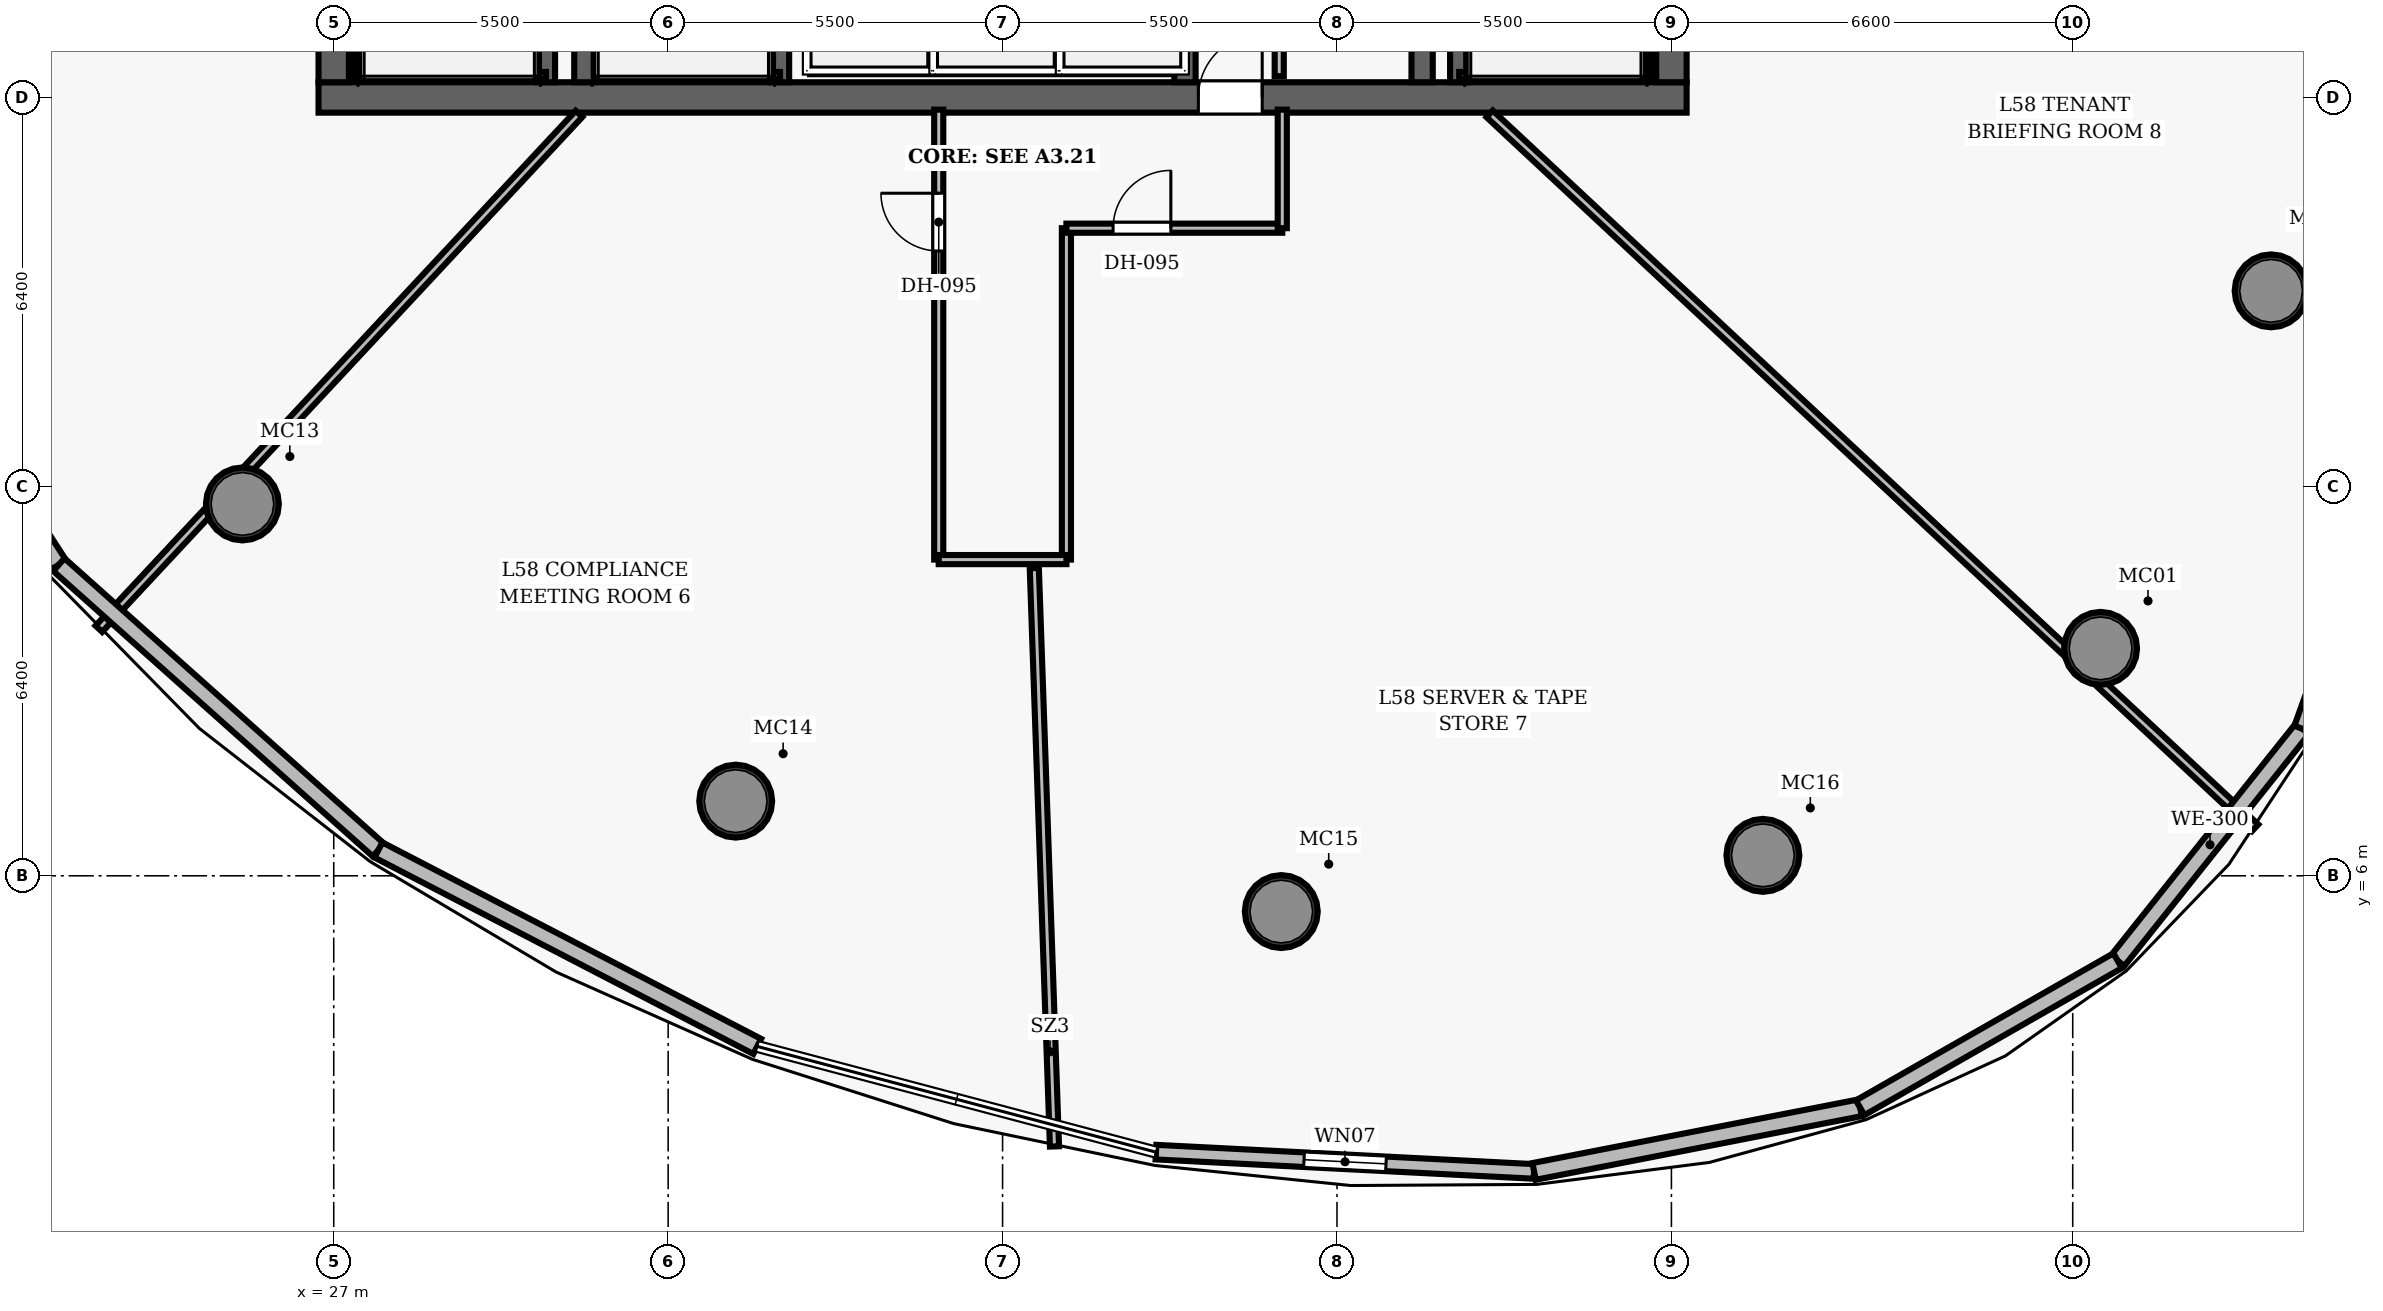
"""IFC4 building model, lengths in metres.
Left out: names, types, materials, properties, quantities, classifications, styles, units other than length and angle.
Written with IfcOpenShell. Run it as: python <this file> out.ifc"""

import sys

from ifc_helpers import new_model, si_unit, direction, frame, frame_2d, origin, origin_2d, place, context, subcontext, project, spatial, rectangle, hollow_circle, extrude, element, fill, save


model = new_model("IFC4")
c1 = context("Model", 3, precision=1e-05, world=origin(), true_north=direction((0.0, 1.0)))
c2 = subcontext(c1, "Body", "Model", "MODEL_VIEW")
j1 = project(units=[si_unit("LENGTHUNIT", "METRE"), si_unit("PLANEANGLEUNIT", "RADIAN")], contexts=[c1])
p1 = place(None, origin())
s1 = spatial("IfcSite", under=j1, at=p1, CompositionType="ELEMENT")
p2 = place(p1, origin())
s2 = spatial("IfcBuilding", under=s1, at=p2, CompositionType="ELEMENT")
p3 = place(p2, frame((0.0, 0.0, 228.95)))
s3 = spatial("IfcBuildingStorey", under=s2, at=p3, CompositionType="ELEMENT", Elevation=228.95)
p4 = place(p3, frame((26.75, 18.8, 0.0), z_axis=(0.0, 0.0, 1.0), x_axis=(1.0, 0.0, 0.0)))
e1 = element("IfcWall", 1, at=p4, inside=s3, PredefinedType="SHEAR", context=c2, shape_type="SweptSolid", body=[
    extrude(rectangle(XDim=22.5, YDim=0.5, at=frame_2d((11.25, 0.0))), origin(), (0.0, 0.0, 1.0), 3.85),
])
p5 = place(p4, frame((14.47, 0.0, 0.0)))
e2 = element("IfcOpeningElement", 2, at=p5, cuts=e1, PredefinedType="OPENING", context=c2, shape_type="SweptSolid", body=[
    extrude(rectangle(XDim=1.05, YDim=2.15, at=frame_2d((0.525, 1.075))), frame((0.0, 0.26, 0.0), z_axis=(0.0, -1.0, 0.0), x_axis=(1.0, 0.0, 0.0)), (0.0, 0.0, 1.0), 0.52),
])
p6 = place(p3, frame((27.0, 19.05, 0.0), z_axis=(0.0, 0.0, 1.0), x_axis=(0.0, 1.0, 0.0)))
e3 = element("IfcWall", 3, at=p6, inside=s3, PredefinedType="SHEAR", context=c2, shape_type="SweptSolid", body=[
    extrude(rectangle(XDim=13.9, YDim=0.5, at=frame_2d((6.95, 0.0))), origin(), (0.0, 0.0, 1.0), 3.85),
])
p7 = place(p6, frame((8.2, 0.0, 0.0)))
e4 = element("IfcOpeningElement", 4, at=p7, cuts=e3, PredefinedType="OPENING", context=c2, shape_type="SweptSolid", body=[
    extrude(rectangle(XDim=1.05, YDim=2.15, at=frame_2d((0.525, 1.075))), frame((0.0, 0.26, 0.0), z_axis=(0.0, -1.0, 0.0), x_axis=(1.0, 0.0, 0.0)), (0.0, 0.0, 1.0), 0.52),
])
p8 = place(p3, frame((49.0, 19.05, 0.0), z_axis=(0.0, 0.0, 1.0), x_axis=(0.0, 1.0, 0.0)))
e5 = element("IfcWall", 5, at=p8, inside=s3, PredefinedType="SHEAR", context=c2, shape_type="SweptSolid", body=[
    extrude(rectangle(XDim=13.9, YDim=0.5, at=frame_2d((6.95, 0.0))), origin(), (0.0, 0.0, 1.0), 3.85),
])
p9 = place(p8, frame((8.2, 0.0, 0.0)))
e6 = element("IfcOpeningElement", 6, at=p9, cuts=e5, PredefinedType="OPENING", context=c2, shape_type="SweptSolid", body=[
    extrude(rectangle(XDim=1.05, YDim=2.15, at=frame_2d((0.525, 1.075))), frame((0.0, 0.26, 0.0), z_axis=(0.0, -1.0, 0.0), x_axis=(1.0, 0.0, 0.0)), (0.0, 0.0, 1.0), 0.52),
])
for number, where, z_axis, x_axis in (
    (7, (31.13, 19.05, 0.0), (0.0, 0.0, 1.0), (0.0, 1.0, 0.0)),
    (8, (44.9, 19.05, 0.0), (0.0, 0.0, 1.0), (0.0, 1.0, 0.0)),
):
    element("IfcWall", number, at=place(p3, frame(where, z_axis=z_axis, x_axis=x_axis)), inside=s3, PredefinedType="SHEAR", context=c2, shape_type="SweptSolid", body=[
        extrude(rectangle(XDim=13.9, YDim=0.35, at=frame_2d((6.95, 0.0))), origin(), (0.0, 0.0, 1.0), 3.85),
    ])
for number, where, z_axis, x_axis in (
    (9, (56.058, 9.74, 0.0), (0.0, 0.0, 1.0), (1.0, 0.0, 0.0)),
    (10, (58.863, 15.619, 0.0), (0.0, 0.0, 1.0), (1.0, 0.0, 0.0)),
    (11, (25.498, 12.115, 0.0), (0.0, 0.0, 1.0), (1.0, 0.0, 0.0)),
    (12, (33.611, 7.228, 0.0), (0.0, 0.0, 1.0), (1.0, 0.0, 0.0)),
    (13, (42.584, 5.412, 0.0), (0.0, 0.0, 1.0), (1.0, 0.0, 0.0)),
    (14, (50.504, 6.336, 0.0), (0.0, 0.0, 1.0), (1.0, 0.0, 0.0)),
):
    element("IfcColumn", number, at=place(p3, frame(where, z_axis=z_axis, x_axis=x_axis)), inside=s3, PredefinedType="COLUMN", context=c2, shape_type="SweptSolid", body=[
        extrude(hollow_circle(Radius=0.6, WallThickness=0.05, at=origin_2d()), origin(), (0.0, 0.0, 1.0), 3.85),
    ])
p10 = place(p3, frame((30.49, 19.05, 0.0), z_axis=(0.0, 0.0, 1.0), x_axis=(0.0, 1.0, 0.0)))
e15 = element("IfcWall", 15, at=p10, inside=s3, PredefinedType="SHEAR", context=c2, shape_type="SweptSolid", body=[
    extrude(rectangle(XDim=7.5, YDim=0.3, at=frame_2d((3.75, 0.0))), origin(), (0.0, 0.0, 1.0), 3.85),
])
p11 = place(p3, frame((27.395, 19.1, 0.0), z_axis=(0.0, 0.0, 1.0), x_axis=(0.0, 1.0, 0.0)))
e16 = element("IfcWall", 16, at=p11, inside=s3, PredefinedType="SHEAR", context=c2, shape_type="SweptSolid", body=[
    extrude(rectangle(XDim=7.45, YDim=0.12, at=frame_2d((3.725, 0.0))), origin(), (0.0, 0.0, 1.0), 3.85),
])
p12 = place(p3, frame((27.395, 19.16, 0.0), z_axis=(0.0, 0.0, 1.0), x_axis=(1.0, 0.0, 0.0)))
e17 = element("IfcWall", 17, at=p12, inside=s3, PredefinedType="SHEAR", context=c2, shape_type="SweptSolid", body=[
    extrude(rectangle(XDim=3.095, YDim=0.12, at=frame_2d((1.547, 0.0))), origin(), (0.0, 0.0, 1.0), 3.85),
])
p13 = place(p3, frame((45.51, 19.05, 0.0), z_axis=(0.0, 0.0, 1.0), x_axis=(0.0, 1.0, 0.0)))
e18 = element("IfcWall", 18, at=p13, inside=s3, PredefinedType="SHEAR", context=c2, shape_type="SweptSolid", body=[
    extrude(rectangle(XDim=7.5, YDim=0.3, at=frame_2d((3.75, 0.0))), origin(), (0.0, 0.0, 1.0), 3.85),
])
p14 = place(p3, frame((48.605, 19.1, 0.0), z_axis=(0.0, 0.0, 1.0), x_axis=(0.0, 1.0, 0.0)))
e19 = element("IfcWall", 19, at=p14, inside=s3, PredefinedType="SHEAR", context=c2, shape_type="SweptSolid", body=[
    extrude(rectangle(XDim=7.45, YDim=0.12, at=frame_2d((3.725, 0.0))), origin(), (0.0, 0.0, 1.0), 3.85),
])
p15 = place(p3, frame((45.51, 19.16, 0.0), z_axis=(0.0, 0.0, 1.0), x_axis=(1.0, 0.0, 0.0)))
e20 = element("IfcWall", 20, at=p15, inside=s3, PredefinedType="SHEAR", context=c2, shape_type="SweptSolid", body=[
    extrude(rectangle(XDim=3.095, YDim=0.12, at=frame_2d((1.547, 0.0))), origin(), (0.0, 0.0, 1.0), 3.85),
])
p16 = place(p3, frame((34.34, 19.05, 0.0), z_axis=(0.0, 0.0, 1.0), x_axis=(0.0, 1.0, 0.0)))
e21 = element("IfcWall", 21, at=p16, inside=s3, PredefinedType="SHEAR", context=c2, shape_type="SweptSolid", body=[
    extrude(rectangle(XDim=7.5, YDim=0.3, at=frame_2d((3.75, 0.0))), origin(), (0.0, 0.0, 1.0), 3.85),
])
p17 = place(p3, frame((31.3, 19.16, 0.0), z_axis=(0.0, 0.0, 1.0), x_axis=(1.0, 0.0, 0.0)))
e22 = element("IfcWall", 22, at=p17, inside=s3, PredefinedType="SHEAR", context=c2, shape_type="SweptSolid", body=[
    extrude(rectangle(XDim=3.04, YDim=0.12, at=frame_2d((1.52, 0.0))), origin(), (0.0, 0.0, 1.0), 3.85),
])
p18 = place(p3, frame((41.0, 19.05, 0.0), z_axis=(0.0, 0.0, 1.0), x_axis=(0.0, 1.0, 0.0)))
e23 = element("IfcWall", 23, at=p18, inside=s3, PredefinedType="SHEAR", context=c2, shape_type="SweptSolid", body=[
    extrude(rectangle(XDim=2.08, YDim=0.35, at=frame_2d((1.04, 0.0))), origin(), (0.0, 0.0, 1.0), 3.035),
])
p19 = place(p3, frame((42.55, 19.15, 0.0), z_axis=(0.0, 0.0, 1.0), x_axis=(0.0, 1.0, 0.0)))
e24 = element("IfcWall", 24, at=p19, inside=s3, PredefinedType="PARTITIONING", context=c2, shape_type="SweptSolid", body=[
    extrude(rectangle(XDim=2.75, YDim=0.15, at=frame_2d((1.375, 0.0))), origin(), (0.0, 0.0, 1.0), 3.035),
])
p20 = place(p19, frame((0.7, 0.0, 0.0)))
e25 = element("IfcOpeningElement", 25, at=p20, cuts=e24, PredefinedType="OPENING", context=c2, shape_type="SweptSolid", body=[
    extrude(rectangle(XDim=0.85, YDim=2.1, at=frame_2d((0.425, 1.05))), frame((0.0, 0.085, 0.0), z_axis=(0.0, -1.0, 0.0), x_axis=(1.0, 0.0, 0.0)), (0.0, 0.0, 1.0), 0.17),
])
p21 = place(p3, frame((36.95, 11.2, 0.0), z_axis=(0.0, 0.0, 1.0), x_axis=(0.0, 1.0, 0.0)))
e26 = element("IfcWall", 26, at=p21, inside=s3, PredefinedType="PARTITIONING", context=c2, shape_type="SweptSolid", body=[
    extrude(rectangle(XDim=7.4, YDim=0.15, at=frame_2d((3.7, 0.0))), origin(), (0.0, 0.0, 1.0), 3.035),
])
p22 = place(p21, frame((5.075, 0.0, 0.0)))
e27 = element("IfcOpeningElement", 27, at=p22, cuts=e26, PredefinedType="OPENING", context=c2, shape_type="SweptSolid", body=[
    extrude(rectangle(XDim=0.95, YDim=2.15, at=frame_2d((0.475, 1.075))), frame((0.0, 0.085, 0.0), z_axis=(0.0, -1.0, 0.0), x_axis=(1.0, 0.0, 0.0)), (0.0, 0.0, 1.0), 0.17),
])
p23 = place(p3, frame((39.05, 11.2, 0.0), z_axis=(0.0, 0.0, 1.0), x_axis=(0.0, 1.0, 0.0)))
e28 = element("IfcWall", 28, at=p23, inside=s3, PredefinedType="PARTITIONING", context=c2, shape_type="SweptSolid", body=[
    extrude(rectangle(XDim=5.45, YDim=0.15, at=frame_2d((2.725, 0.0))), origin(), (0.0, 0.0, 1.0), 3.035),
])
p24 = place(p3, frame((39.05, 16.65, 0.0), z_axis=(0.0, 0.0, 1.0), x_axis=(1.0, 0.0, 0.0)))
e29 = element("IfcWall", 29, at=p24, inside=s3, PredefinedType="PARTITIONING", context=c2, shape_type="SweptSolid", body=[
    extrude(rectangle(XDim=3.55, YDim=0.15, at=frame_2d((1.775, 0.0))), origin(), (0.0, 0.0, 1.0), 3.035),
])
p25 = place(p24, frame((0.768, 0.0, 0.0)))
e30 = element("IfcOpeningElement", 30, at=p25, cuts=e29, PredefinedType="OPENING", context=c2, shape_type="SweptSolid", body=[
    extrude(rectangle(XDim=0.95, YDim=2.15, at=frame_2d((0.475, 1.075))), frame((0.0, 0.085, 0.0), z_axis=(0.0, -1.0, 0.0), x_axis=(1.0, 0.0, 0.0)), (0.0, 0.0, 1.0), 0.17),
])
p26 = place(p3, frame((42.6, 16.65, 0.0), z_axis=(0.0, 0.0, 1.0), x_axis=(0.0, 1.0, 0.0)))
e31 = element("IfcWall", 31, at=p26, inside=s3, PredefinedType="PARTITIONING", context=c2, shape_type="SweptSolid", body=[
    extrude(rectangle(XDim=1.95, YDim=0.15, at=frame_2d((0.975, 0.0))), origin(), (0.0, 0.0, 1.0), 3.035),
])
p27 = place(p3, frame((36.95, 11.2, 0.0), z_axis=(0.0, 0.0, 1.0), x_axis=(1.0, 0.0, 0.0)))
e32 = element("IfcWall", 32, at=p27, inside=s3, PredefinedType="PARTITIONING", context=c2, shape_type="SweptSolid", body=[
    extrude(rectangle(XDim=2.1, YDim=0.15, at=frame_2d((1.05, 0.0))), origin(), (0.0, 0.0, 1.0), 3.035),
])
p28 = place(p3, frame((31.034, 18.53, 0.0), z_axis=(0.0, 0.0, 1.0), x_axis=(-0.681996659479, -0.731355287435, 0.0)))
e33 = element("IfcWall", 33, at=p28, inside=s3, PredefinedType="PARTITIONING", context=c2, shape_type="SweptSolid", body=[
    extrude(rectangle(XDim=11.579, YDim=0.15, at=frame_2d((5.79, 0.0))), origin(), (0.0, 0.0, 1.0), 3.035),
])
p29 = place(p3, frame((38.522, 11.06, 0.0), z_axis=(0.0, 0.0, 1.0), x_axis=(0.034889926563, -0.99939116117, 0.0)))
e34 = element("IfcWall", 34, at=p29, inside=s3, PredefinedType="PARTITIONING", context=c2, shape_type="SweptSolid", body=[
    extrude(rectangle(XDim=9.517, YDim=0.15, at=frame_2d((4.758, 0.0))), origin(), (0.0, 0.0, 1.0), 3.035),
])
p30 = place(p3, frame((46.01, 18.53, 0.0), z_axis=(0.0, 0.0, 1.0), x_axis=(0.731353262769, -0.681998830671, 0.0)))
e35 = element("IfcWall", 35, at=p30, inside=s3, PredefinedType="PARTITIONING", context=c2, shape_type="SweptSolid", body=[
    extrude(rectangle(XDim=17.214, YDim=0.15, at=frame_2d((8.607, 0.0))), origin(), (0.0, 0.0, 1.0), 3.035),
])
p31 = place(p3, frame((59.377, 8.418, 0.0), z_axis=(0.0, 0.0, 1.0), x_axis=(-0.622977845152, -0.782239480242, 0.0)))
e36 = element("IfcWall", 36, at=p31, inside=s3, PredefinedType="SOLIDWALL", context=c2, shape_type="SweptSolid", body=[
    extrude(rectangle(XDim=4.876, YDim=0.28, at=frame_2d((2.438, 0.0))), origin(), (0.0, 0.0, 1.0), 3.62),
])
p32 = place(p3, frame((61.232, 13.558, 0.0), z_axis=(0.0, 0.0, 1.0), x_axis=(-0.339467695369, -0.940617713952, 0.0)))
e37 = element("IfcWall", 37, at=p32, inside=s3, PredefinedType="SOLIDWALL", context=c2, shape_type="SweptSolid", body=[
    extrude(rectangle(XDim=5.464, YDim=0.28, at=frame_2d((2.732, 0.0))), origin(), (0.0, 0.0, 1.0), 3.62),
])
for number, where, z_axis, x_axis in (
    (38, (22.479, 11.116, 0.0), (0.0, 0.0, 1.0), (-0.544, 0.839, 0.0)),
    (39, (27.735, 6.425, 0.0), (0.0, 0.0, 1.0), (-0.746, 0.666, 0.0)),
):
    element("IfcWall", number, at=place(p3, frame(where, z_axis=z_axis, x_axis=x_axis)), inside=s3, PredefinedType="SOLIDWALL", context=c2, shape_type="SweptSolid", body=[
        extrude(rectangle(XDim=7.046, YDim=0.28, at=frame_2d((3.523, 0.0))), origin(), (0.0, 0.0, 1.0), 3.62),
    ])
p33 = place(p3, frame((33.965, 3.194, 0.0), z_axis=(0.0, 0.0, 1.0), x_axis=(-0.887740840653, 0.460343567172, 0.0)))
e40 = element("IfcWall", 40, at=p33, inside=s3, PredefinedType="SOLIDWALL", context=c2, shape_type="SweptSolid", body=[
    extrude(rectangle(XDim=7.018, YDim=0.28, at=frame_2d((3.509, 0.0))), origin(), (0.0, 0.0, 1.0), 3.62),
])
p34 = place(p3, frame((46.741, 1.138, 0.0), z_axis=(0.0, 0.0, 1.0), x_axis=(-0.99869997625, 0.050974085949, 0.0)))
e41 = element("IfcWall", 41, at=p34, inside=s3, PredefinedType="SOLIDWALL", context=c2, shape_type="SweptSolid", body=[
    extrude(rectangle(XDim=6.226, YDim=0.24, at=frame_2d((3.113, 0.0))), origin(), (0.0, 0.0, 1.0), 3.62),
])
p35 = place(p34, frame((2.438, 0.0, 0.85)))
e42 = element("IfcOpeningElement", 42, at=p35, cuts=e41, PredefinedType="OPENING", context=c2, shape_type="SweptSolid", body=[
    extrude(rectangle(XDim=1.35, YDim=1.65, at=frame_2d((0.675, 0.825))), frame((0.0, 0.13, 0.0), z_axis=(0.0, -1.0, 0.0), x_axis=(1.0, 0.0, 0.0)), (0.0, 0.0, 1.0), 0.26),
])
p36 = place(p3, frame((52.104, 2.185, 0.0), z_axis=(0.0, 0.0, 1.0), x_axis=(-0.981469079326, -0.19162057908, 0.0)))
e43 = element("IfcWall", 43, at=p36, inside=s3, PredefinedType="SOLIDWALL", context=c2, shape_type="SweptSolid", body=[
    extrude(rectangle(XDim=5.465, YDim=0.28, at=frame_2d((2.732, 0.0))), origin(), (0.0, 0.0, 1.0), 3.62),
])
p37 = place(p3, frame((56.339, 4.604, 0.0), z_axis=(0.0, 0.0, 1.0), x_axis=(-0.868347876631, -0.495955608044, 0.0)))
e44 = element("IfcWall", 44, at=p37, inside=s3, PredefinedType="SOLIDWALL", context=c2, shape_type="SweptSolid", body=[
    extrude(rectangle(XDim=4.876, YDim=0.28, at=frame_2d((2.438, 0.0))), origin(), (0.0, 0.0, 1.0), 3.62),
])
p38 = place(p5, origin())
e45 = element("IfcDoor", 45, at=p38, inside=s3, OperationType="SINGLE_SWING_RIGHT", PredefinedType="DOOR", context=c2, shape_type="SweptSolid", body=[
    extrude(rectangle(XDim=1.05, YDim=2.15, at=frame_2d((0.525, 1.075))), frame((0.0, 0.025, 0.0), z_axis=(0.0, -1.0, 0.0), x_axis=(1.0, 0.0, 0.0)), (0.0, 0.0, 1.0), 0.05),
])
fill(e2, e45)
p39 = place(p22, origin())
e46 = element("IfcDoor", 46, at=p39, inside=s3, OperationType="SINGLE_SWING_RIGHT", PredefinedType="DOOR", context=c2, shape_type="SweptSolid", body=[
    extrude(rectangle(XDim=0.95, YDim=2.15, at=frame_2d((0.475, 1.075))), frame((0.0, 0.025, 0.0), z_axis=(0.0, -1.0, 0.0), x_axis=(1.0, 0.0, 0.0)), (0.0, 0.0, 1.0), 0.05),
])
fill(e27, e46)
p40 = place(p25, origin())
e47 = element("IfcDoor", 47, at=p40, inside=s3, OperationType="SINGLE_SWING_RIGHT", PredefinedType="DOOR", context=c2, shape_type="SweptSolid", body=[
    extrude(rectangle(XDim=0.95, YDim=2.15, at=frame_2d((0.475, 1.075))), frame((0.0, 0.025, 0.0), z_axis=(0.0, -1.0, 0.0), x_axis=(1.0, 0.0, 0.0)), (0.0, 0.0, 1.0), 0.05),
])
fill(e30, e47)
p41 = place(p35, origin())
e48 = element("IfcWindow", 48, at=p41, inside=s3, PartitioningType="SINGLE_PANEL", PredefinedType="WINDOW", context=c2, shape_type="SweptSolid", body=[
    extrude(rectangle(XDim=1.35, YDim=1.65, at=frame_2d((0.675, 0.825))), frame((0.0, 0.03, 0.0), z_axis=(0.0, -1.0, 0.0), x_axis=(1.0, 0.0, 0.0)), (0.0, 0.0, 1.0), 0.06),
])
fill(e42, e48)
save(model, sys.argv[1])
